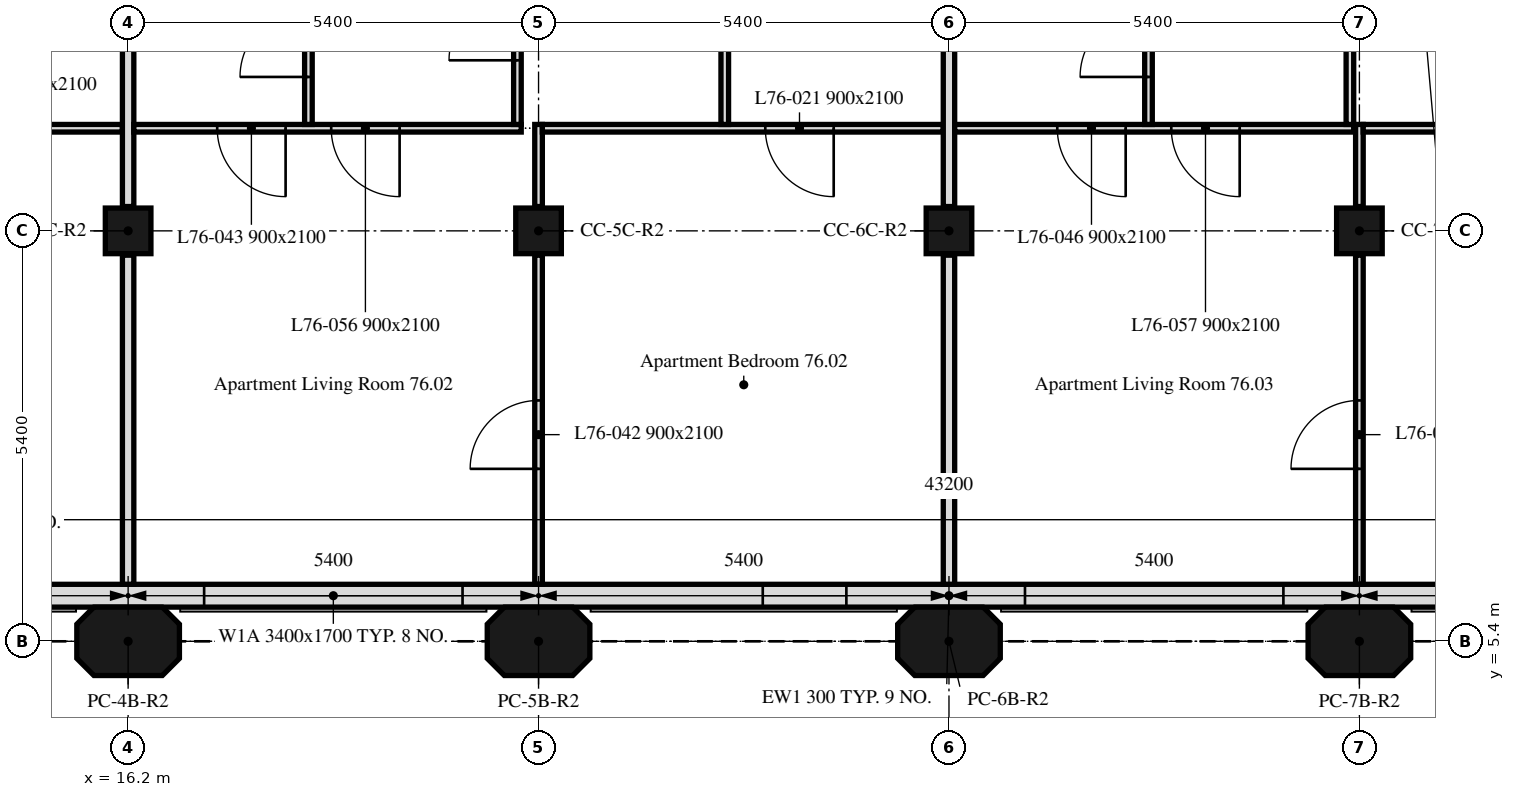
"""IFC4 building model, lengths in metres.
Left out: names, types, materials, properties, quantities, classifications, styles, units other than length and angle.
Written with IfcOpenShell. Run it as: python <this file> out.ifc"""

import sys

from ifc_helpers import new_model, si_unit, direction, frame, frame_2d, origin, origin_2d, place, context, subcontext, project, spatial, polyline, rectangle, outline, extrude, element, fill, save


model = new_model("IFC4")
c1 = context("Model", 3, precision=1e-05, world=origin(), true_north=direction((0.0, 1.0)))
c2 = subcontext(c1, "Body", "Model", "MODEL_VIEW")
j1 = project(units=[si_unit("LENGTHUNIT", "METRE"), si_unit("PLANEANGLEUNIT", "RADIAN")], contexts=[c1])
p1 = place(None, origin())
s1 = spatial("IfcSite", under=j1, at=p1, CompositionType="ELEMENT")
p2 = place(p1, origin())
s2 = spatial("IfcBuilding", under=s1, at=p2, CompositionType="ELEMENT")
p3 = place(p2, frame((0.0, 0.0, 304.9)))
s3 = spatial("IfcBuildingStorey", under=s2, at=p3, CompositionType="ELEMENT", Elevation=304.9)
for number, where, z_axis, x_axis in (
    (1, (16.2, 5.4, 0.0), (0.0, 0.0, 1.0), (1.0, 0.0, 0.0)),
    (2, (21.6, 5.4, 0.0), (0.0, 0.0, 1.0), (1.0, 0.0, 0.0)),
    (3, (27.0, 5.4, 0.0), (0.0, 0.0, 1.0), (1.0, 0.0, 0.0)),
    (4, (32.4, 5.4, 0.0), (0.0, 0.0, 1.0), (1.0, 0.0, 0.0)),
):
    element("IfcColumn", number, at=place(p3, frame(where, z_axis=z_axis, x_axis=x_axis)), inside=s3, PredefinedType="COLUMN", context=c2, shape_type="SweptSolid", body=[
        extrude(outline(polyline([(-0.45, -0.45), (0.45, -0.45), (0.675, -0.225), (0.675, 0.225), (0.45, 0.45), (-0.45, 0.45), (-0.675, 0.225), (-0.675, -0.225), (-0.45, -0.45)])), origin(), (0.0, 0.0, 1.0), 2.8),
    ])
for number, where, z_axis, x_axis in (
    (5, (16.2, 10.8, 0.0), (0.0, 0.0, 1.0), (1.0, 0.0, 0.0)),
    (6, (21.6, 10.8, 0.0), (0.0, 0.0, 1.0), (1.0, 0.0, 0.0)),
    (7, (27.0, 10.8, 0.0), (0.0, 0.0, 1.0), (1.0, 0.0, 0.0)),
    (8, (32.4, 10.8, 0.0), (0.0, 0.0, 1.0), (1.0, 0.0, 0.0)),
):
    element("IfcColumn", number, at=place(p3, frame(where, z_axis=z_axis, x_axis=x_axis)), inside=s3, PredefinedType="COLUMN", context=c2, shape_type="SweptSolid", body=[
        extrude(rectangle(XDim=0.6, YDim=0.6, at=origin_2d()), origin(), (0.0, 0.0, 1.0), 2.8),
    ])
p4 = place(p3, frame((10.986, 6.0, 0.0), z_axis=(0.0, 0.0, 1.0), x_axis=(1.0, 0.0, 0.0)))
e9 = element("IfcWall", 9, at=p4, inside=s3, PredefinedType="SOLIDWALL", context=c2, shape_type="SweptSolid", body=[
    extrude(rectangle(XDim=32.027, YDim=0.3, at=frame_2d((16.014, 0.0))), origin(), (0.0, 0.0, 1.0), 2.8),
])
p5 = place(p4, frame((2.764, 0.0, 0.9)))
e10 = element("IfcOpeningElement", 10, at=p5, cuts=e9, PredefinedType="OPENING", context=c2, shape_type="SweptSolid", body=[
    extrude(rectangle(XDim=1.1, YDim=1.7, at=frame_2d((0.55, 0.85))), frame((0.0, 0.16, 0.0), z_axis=(0.0, -1.0, 0.0), x_axis=(1.0, 0.0, 0.0)), (0.0, 0.0, 1.0), 0.32),
])
p6 = place(p4, frame((6.214, 0.0, 0.9)))
e11 = element("IfcOpeningElement", 11, at=p6, cuts=e9, PredefinedType="OPENING", context=c2, shape_type="SweptSolid", body=[
    extrude(rectangle(XDim=3.4, YDim=1.7, at=frame_2d((1.7, 0.85))), frame((0.0, 0.16, 0.0), z_axis=(0.0, -1.0, 0.0), x_axis=(1.0, 0.0, 0.0)), (0.0, 0.0, 1.0), 0.32),
])
p7 = place(p4, frame((13.564, 0.0, 0.9)))
e12 = element("IfcOpeningElement", 12, at=p7, cuts=e9, PredefinedType="OPENING", context=c2, shape_type="SweptSolid", body=[
    extrude(rectangle(XDim=1.1, YDim=1.7, at=frame_2d((0.55, 0.85))), frame((0.0, 0.16, 0.0), z_axis=(0.0, -1.0, 0.0), x_axis=(1.0, 0.0, 0.0)), (0.0, 0.0, 1.0), 0.32),
])
p8 = place(p4, frame((17.014, 0.0, 0.9)))
e13 = element("IfcOpeningElement", 13, at=p8, cuts=e9, PredefinedType="OPENING", context=c2, shape_type="SweptSolid", body=[
    extrude(rectangle(XDim=3.4, YDim=1.7, at=frame_2d((1.7, 0.85))), frame((0.0, 0.16, 0.0), z_axis=(0.0, -1.0, 0.0), x_axis=(1.0, 0.0, 0.0)), (0.0, 0.0, 1.0), 0.32),
])
p9 = place(p4, frame((24.364, 0.0, 0.9)))
e14 = element("IfcOpeningElement", 14, at=p9, cuts=e9, PredefinedType="OPENING", context=c2, shape_type="SweptSolid", body=[
    extrude(rectangle(XDim=1.1, YDim=1.7, at=frame_2d((0.55, 0.85))), frame((0.0, 0.16, 0.0), z_axis=(0.0, -1.0, 0.0), x_axis=(1.0, 0.0, 0.0)), (0.0, 0.0, 1.0), 0.32),
])
p10 = place(p4, frame((27.814, 0.0, 0.9)))
e15 = element("IfcOpeningElement", 15, at=p10, cuts=e9, PredefinedType="OPENING", context=c2, shape_type="SweptSolid", body=[
    extrude(rectangle(XDim=3.4, YDim=1.7, at=frame_2d((1.7, 0.85))), frame((0.0, 0.16, 0.0), z_axis=(0.0, -1.0, 0.0), x_axis=(1.0, 0.0, 0.0)), (0.0, 0.0, 1.0), 0.32),
])
p11 = place(p3, frame((16.2, 6.151, 0.0), z_axis=(0.0, 0.0, 1.0), x_axis=(0.0, 1.0, 0.0)))
e16 = element("IfcWall", 16, at=p11, inside=s3, PredefinedType="PARTITIONING", context=c2, shape_type="SweptSolid", body=[
    extrude(rectangle(XDim=4.329, YDim=0.15, at=frame_2d((2.165, 0.0))), origin(), (0.0, 0.0, 1.0), 2.8),
])
p12 = place(p3, frame((16.125, 12.15, 0.0), z_axis=(0.0, 0.0, 1.0), x_axis=(-1.0, 0.0, 0.0)))
e17 = element("IfcWall", 17, at=p12, inside=s3, PredefinedType="PARTITIONING", context=c2, shape_type="SweptSolid", body=[
    extrude(rectangle(XDim=5.275, YDim=0.1, at=frame_2d((2.637, 0.0))), origin(), (0.0, 0.0, 1.0), 2.8),
])
p13 = place(p12, frame((1.43, 0.0, 0.0)))
e18 = element("IfcOpeningElement", 18, at=p13, cuts=e17, PredefinedType="OPENING", context=c2, shape_type="SweptSolid", body=[
    extrude(rectangle(XDim=0.9, YDim=2.1, at=frame_2d((0.45, 1.05))), frame((0.0, 0.05, 0.0), z_axis=(0.0, -1.0, 0.0), x_axis=(1.0, 0.0, 0.0)), (0.0, 0.0, 1.0), 0.1),
])
p14 = place(p3, frame((16.2, 11.12, 0.0), z_axis=(0.0, 0.0, 1.0), x_axis=(0.0, 1.0, 0.0)))
e19 = element("IfcWall", 19, at=p14, inside=s3, PredefinedType="PARTITIONING", context=c2, shape_type="SweptSolid", body=[
    extrude(rectangle(XDim=3.205, YDim=0.15, at=frame_2d((1.603, 0.0))), origin(), (0.0, 0.0, 1.0), 2.8),
])
p15 = place(p3, frame((21.6, 6.151, 0.0), z_axis=(0.0, 0.0, 1.0), x_axis=(0.0, 1.0, 0.0)))
e20 = element("IfcWall", 20, at=p15, inside=s3, PredefinedType="PARTITIONING", context=c2, shape_type="SweptSolid", body=[
    extrude(rectangle(XDim=4.329, YDim=0.1, at=frame_2d((2.165, 0.0))), origin(), (0.0, 0.0, 1.0), 2.8),
])
p16 = place(p15, frame((1.518, 0.0, 0.0)))
e21 = element("IfcOpeningElement", 21, at=p16, cuts=e20, PredefinedType="OPENING", context=c2, shape_type="SweptSolid", body=[
    extrude(rectangle(XDim=0.9, YDim=2.1, at=frame_2d((0.45, 1.05))), frame((0.0, 0.05, 0.0), z_axis=(0.0, -1.0, 0.0), x_axis=(1.0, 0.0, 0.0)), (0.0, 0.0, 1.0), 0.1),
])
p17 = place(p3, frame((21.6, 11.12, 0.0), z_axis=(0.0, 0.0, 1.0), x_axis=(0.0, 1.0, 0.0)))
e22 = element("IfcWall", 22, at=p17, inside=s3, PredefinedType="PARTITIONING", context=c2, shape_type="SweptSolid", body=[
    extrude(rectangle(XDim=1.08, YDim=0.1, at=frame_2d((0.54, 0.0))), origin(), (0.0, 0.0, 1.0), 2.8),
])
p18 = place(p3, frame((21.372, 12.15, 0.0), z_axis=(0.0, 0.0, 1.0), x_axis=(-1.0, 0.0, 0.0)))
e23 = element("IfcWall", 23, at=p18, inside=s3, PredefinedType="PARTITIONING", context=c2, shape_type="SweptSolid", body=[
    extrude(rectangle(XDim=5.097, YDim=0.1, at=frame_2d((2.549, 0.0))), origin(), (0.0, 0.0, 1.0), 2.8),
])
p19 = place(p18, frame((3.1, 0.0, 0.0)))
e24 = element("IfcOpeningElement", 24, at=p19, cuts=e23, PredefinedType="OPENING", context=c2, shape_type="SweptSolid", body=[
    extrude(rectangle(XDim=0.9, YDim=2.1, at=frame_2d((0.45, 1.05))), frame((0.0, 0.05, 0.0), z_axis=(0.0, -1.0, 0.0), x_axis=(1.0, 0.0, 0.0)), (0.0, 0.0, 1.0), 0.1),
])
p20 = place(p18, frame((1.6, 0.0, 0.0)))
e25 = element("IfcOpeningElement", 25, at=p20, cuts=e23, PredefinedType="OPENING", context=c2, shape_type="SweptSolid", body=[
    extrude(rectangle(XDim=0.9, YDim=2.1, at=frame_2d((0.45, 1.05))), frame((0.0, 0.05, 0.0), z_axis=(0.0, -1.0, 0.0), x_axis=(1.0, 0.0, 0.0)), (0.0, 0.0, 1.0), 0.1),
])
p21 = place(p3, frame((27.0, 6.151, 0.0), z_axis=(0.0, 0.0, 1.0), x_axis=(0.0, 1.0, 0.0)))
e26 = element("IfcWall", 26, at=p21, inside=s3, PredefinedType="PARTITIONING", context=c2, shape_type="SweptSolid", body=[
    extrude(rectangle(XDim=4.329, YDim=0.15, at=frame_2d((2.165, 0.0))), origin(), (0.0, 0.0, 1.0), 2.8),
])
p22 = place(p3, frame((26.925, 12.15, 0.0), z_axis=(0.0, 0.0, 1.0), x_axis=(-1.0, 0.0, 0.0)))
e27 = element("IfcWall", 27, at=p22, inside=s3, PredefinedType="PARTITIONING", context=c2, shape_type="SweptSolid", body=[
    extrude(rectangle(XDim=5.275, YDim=0.1, at=frame_2d((2.638, 0.0))), origin(), (0.0, 0.0, 1.0), 2.8),
])
p23 = place(p22, frame((1.442, 0.0, 0.0)))
e28 = element("IfcOpeningElement", 28, at=p23, cuts=e27, PredefinedType="OPENING", context=c2, shape_type="SweptSolid", body=[
    extrude(rectangle(XDim=0.9, YDim=2.1, at=frame_2d((0.45, 1.05))), frame((0.0, 0.05, 0.0), z_axis=(0.0, -1.0, 0.0), x_axis=(1.0, 0.0, 0.0)), (0.0, 0.0, 1.0), 0.1),
])
p24 = place(p3, frame((18.572, 12.2, 0.0), z_axis=(0.0, 0.0, 1.0), x_axis=(0.0, 1.0, 0.0)))
e29 = element("IfcWall", 29, at=p24, inside=s3, PredefinedType="PARTITIONING", context=c2, shape_type="SweptSolid", body=[
    extrude(rectangle(XDim=2.125, YDim=0.1, at=frame_2d((1.062, 0.0))), origin(), (0.0, 0.0, 1.0), 2.8),
])
p25 = place(p24, frame((0.625, 0.0, 0.0)))
e30 = element("IfcOpeningElement", 30, at=p25, cuts=e29, PredefinedType="OPENING", context=c2, shape_type="SweptSolid", body=[
    extrude(rectangle(XDim=0.9, YDim=2.1, at=frame_2d((0.45, 1.05))), frame((0.0, 0.05, 0.0), z_axis=(0.0, -1.0, 0.0), x_axis=(1.0, 0.0, 0.0)), (0.0, 0.0, 1.0), 0.1),
])
p26 = place(p3, frame((21.322, 12.2, 0.0), z_axis=(0.0, 0.0, 1.0), x_axis=(0.0, 1.0, 0.0)))
e31 = element("IfcWall", 31, at=p26, inside=s3, PredefinedType="PARTITIONING", context=c2, shape_type="SweptSolid", body=[
    extrude(rectangle(XDim=2.125, YDim=0.1, at=frame_2d((1.062, 0.0))), origin(), (0.0, 0.0, 1.0), 2.8),
])
p27 = place(p26, frame((0.844, 0.0, 0.0)))
e32 = element("IfcOpeningElement", 32, at=p27, cuts=e31, PredefinedType="OPENING", context=c2, shape_type="SweptSolid", body=[
    extrude(rectangle(XDim=0.9, YDim=2.1, at=frame_2d((0.45, 1.05))), frame((0.0, 0.05, 0.0), z_axis=(0.0, -1.0, 0.0), x_axis=(1.0, 0.0, 0.0)), (0.0, 0.0, 1.0), 0.1),
])
p28 = place(p3, frame((24.05, 12.2, 0.0), z_axis=(0.0, 0.0, 1.0), x_axis=(0.0, 1.0, 0.0)))
e33 = element("IfcWall", 33, at=p28, inside=s3, PredefinedType="PARTITIONING", context=c2, shape_type="SweptSolid", body=[
    extrude(rectangle(XDim=2.125, YDim=0.1, at=frame_2d((1.062, 0.0))), origin(), (0.0, 0.0, 1.0), 2.8),
])
p29 = place(p3, frame((27.0, 11.12, 0.0), z_axis=(0.0, 0.0, 1.0), x_axis=(0.0, 1.0, 0.0)))
e34 = element("IfcWall", 34, at=p29, inside=s3, PredefinedType="PARTITIONING", context=c2, shape_type="SweptSolid", body=[
    extrude(rectangle(XDim=3.205, YDim=0.15, at=frame_2d((1.603, 0.0))), origin(), (0.0, 0.0, 1.0), 2.8),
])
p30 = place(p3, frame((32.4, 6.151, 0.0), z_axis=(0.0, 0.0, 1.0), x_axis=(0.0, 1.0, 0.0)))
e35 = element("IfcWall", 35, at=p30, inside=s3, PredefinedType="PARTITIONING", context=c2, shape_type="SweptSolid", body=[
    extrude(rectangle(XDim=4.329, YDim=0.1, at=frame_2d((2.165, 0.0))), origin(), (0.0, 0.0, 1.0), 2.8),
])
p31 = place(p30, frame((1.518, 0.0, 0.0)))
e36 = element("IfcOpeningElement", 36, at=p31, cuts=e35, PredefinedType="OPENING", context=c2, shape_type="SweptSolid", body=[
    extrude(rectangle(XDim=0.9, YDim=2.1, at=frame_2d((0.45, 1.05))), frame((0.0, 0.05, 0.0), z_axis=(0.0, -1.0, 0.0), x_axis=(1.0, 0.0, 0.0)), (0.0, 0.0, 1.0), 0.1),
])
p32 = place(p3, frame((32.4, 11.12, 0.0), z_axis=(0.0, 0.0, 1.0), x_axis=(0.0, 1.0, 0.0)))
e37 = element("IfcWall", 37, at=p32, inside=s3, PredefinedType="PARTITIONING", context=c2, shape_type="SweptSolid", body=[
    extrude(rectangle(XDim=1.08, YDim=0.1, at=frame_2d((0.54, 0.0))), origin(), (0.0, 0.0, 1.0), 2.8),
])
p33 = place(p3, frame((32.325, 12.15, 0.0), z_axis=(0.0, 0.0, 1.0), x_axis=(-1.0, 0.0, 0.0)))
e38 = element("IfcWall", 38, at=p33, inside=s3, PredefinedType="PARTITIONING", context=c2, shape_type="SweptSolid", body=[
    extrude(rectangle(XDim=5.25, YDim=0.1, at=frame_2d((2.625, 0.0))), origin(), (0.0, 0.0, 1.0), 2.8),
])
p34 = place(p33, frame((3.0, 0.0, 0.0)))
e39 = element("IfcOpeningElement", 39, at=p34, cuts=e38, PredefinedType="OPENING", context=c2, shape_type="SweptSolid", body=[
    extrude(rectangle(XDim=0.9, YDim=2.1, at=frame_2d((0.45, 1.05))), frame((0.0, 0.05, 0.0), z_axis=(0.0, -1.0, 0.0), x_axis=(1.0, 0.0, 0.0)), (0.0, 0.0, 1.0), 0.1),
])
p35 = place(p33, frame((1.5, 0.0, 0.0)))
e40 = element("IfcOpeningElement", 40, at=p35, cuts=e38, PredefinedType="OPENING", context=c2, shape_type="SweptSolid", body=[
    extrude(rectangle(XDim=0.9, YDim=2.1, at=frame_2d((0.45, 1.05))), frame((0.0, 0.05, 0.0), z_axis=(0.0, -1.0, 0.0), x_axis=(1.0, 0.0, 0.0)), (0.0, 0.0, 1.0), 0.1),
])
p36 = place(p3, frame((37.725, 12.15, 0.0), z_axis=(0.0, 0.0, 1.0), x_axis=(-1.0, 0.0, 0.0)))
e41 = element("IfcWall", 41, at=p36, inside=s3, PredefinedType="PARTITIONING", context=c2, shape_type="SweptSolid", body=[
    extrude(rectangle(XDim=5.275, YDim=0.1, at=frame_2d((2.638, 0.0))), origin(), (0.0, 0.0, 1.0), 2.8),
])
p37 = place(p36, frame((2.155, 0.0, 0.0)))
e42 = element("IfcOpeningElement", 42, at=p37, cuts=e41, PredefinedType="OPENING", context=c2, shape_type="SweptSolid", body=[
    extrude(rectangle(XDim=0.9, YDim=2.1, at=frame_2d((0.45, 1.05))), frame((0.0, 0.05, 0.0), z_axis=(0.0, -1.0, 0.0), x_axis=(1.0, 0.0, 0.0)), (0.0, 0.0, 1.0), 0.1),
])
p38 = place(p3, frame((29.625, 12.2, 0.0), z_axis=(0.0, 0.0, 1.0), x_axis=(0.0, 1.0, 0.0)))
e43 = element("IfcWall", 43, at=p38, inside=s3, PredefinedType="PARTITIONING", context=c2, shape_type="SweptSolid", body=[
    extrude(rectangle(XDim=2.125, YDim=0.1, at=frame_2d((1.062, 0.0))), origin(), (0.0, 0.0, 1.0), 2.8),
])
p39 = place(p38, frame((0.625, 0.0, 0.0)))
e44 = element("IfcOpeningElement", 44, at=p39, cuts=e43, PredefinedType="OPENING", context=c2, shape_type="SweptSolid", body=[
    extrude(rectangle(XDim=0.9, YDim=2.1, at=frame_2d((0.45, 1.05))), frame((0.0, 0.05, 0.0), z_axis=(0.0, -1.0, 0.0), x_axis=(1.0, 0.0, 0.0)), (0.0, 0.0, 1.0), 0.1),
])
p40 = place(p3, frame((32.275, 12.2, 0.0), z_axis=(0.0, 0.0, 1.0), x_axis=(0.0, 1.0, 0.0)))
e45 = element("IfcWall", 45, at=p40, inside=s3, PredefinedType="PARTITIONING", context=c2, shape_type="SweptSolid", body=[
    extrude(rectangle(XDim=2.125, YDim=0.1, at=frame_2d((1.062, 0.0))), origin(), (0.0, 0.0, 1.0), 2.8),
])
p41 = place(p40, frame((0.975, 0.0, 0.0)))
e46 = element("IfcOpeningElement", 46, at=p41, cuts=e45, PredefinedType="OPENING", context=c2, shape_type="SweptSolid", body=[
    extrude(rectangle(XDim=0.9, YDim=2.1, at=frame_2d((0.45, 1.05))), frame((0.0, 0.05, 0.0), z_axis=(0.0, -1.0, 0.0), x_axis=(1.0, 0.0, 0.0)), (0.0, 0.0, 1.0), 0.1),
])
p42 = place(p6, origin())
e47 = element("IfcWindow", 47, at=p42, inside=s3, PartitioningType="SINGLE_PANEL", PredefinedType="WINDOW", context=c2, shape_type="SweptSolid", body=[
    extrude(rectangle(XDim=3.4, YDim=1.7, at=frame_2d((1.7, 0.85))), frame((0.0, 0.03, 0.0), z_axis=(0.0, -1.0, 0.0), x_axis=(1.0, 0.0, 0.0)), (0.0, 0.0, 1.0), 0.06),
])
fill(e11, e47)
p43 = place(p7, origin())
e48 = element("IfcWindow", 48, at=p43, inside=s3, PartitioningType="SINGLE_PANEL", PredefinedType="WINDOW", context=c2, shape_type="SweptSolid", body=[
    extrude(rectangle(XDim=1.1, YDim=1.7, at=frame_2d((0.55, 0.85))), frame((0.0, 0.03, 0.0), z_axis=(0.0, -1.0, 0.0), x_axis=(1.0, 0.0, 0.0)), (0.0, 0.0, 1.0), 0.06),
])
fill(e12, e48)
p44 = place(p8, origin())
e49 = element("IfcWindow", 49, at=p44, inside=s3, PartitioningType="SINGLE_PANEL", PredefinedType="WINDOW", context=c2, shape_type="SweptSolid", body=[
    extrude(rectangle(XDim=3.4, YDim=1.7, at=frame_2d((1.7, 0.85))), frame((0.0, 0.03, 0.0), z_axis=(0.0, -1.0, 0.0), x_axis=(1.0, 0.0, 0.0)), (0.0, 0.0, 1.0), 0.06),
])
fill(e13, e49)
p45 = place(p23, origin())
e50 = element("IfcDoor", 50, at=p45, inside=s3, OperationType="SINGLE_SWING_LEFT", PredefinedType="DOOR", context=c2, shape_type="SweptSolid", body=[
    extrude(rectangle(XDim=0.9, YDim=2.1, at=frame_2d((0.45, 1.05))), frame((0.0, 0.025, 0.0), z_axis=(0.0, -1.0, 0.0), x_axis=(1.0, 0.0, 0.0)), (0.0, 0.0, 1.0), 0.05),
])
fill(e28, e50)
p46 = place(p27, origin())
e51 = element("IfcDoor", 51, at=p46, inside=s3, OperationType="SINGLE_SWING_LEFT", PredefinedType="DOOR", context=c2, shape_type="SweptSolid", body=[
    extrude(rectangle(XDim=0.9, YDim=2.1, at=frame_2d((0.45, 1.05))), frame((0.0, 0.025, 0.0), z_axis=(0.0, -1.0, 0.0), x_axis=(1.0, 0.0, 0.0)), (0.0, 0.0, 1.0), 0.05),
])
fill(e32, e51)
p47 = place(p16, origin())
e52 = element("IfcDoor", 52, at=p47, inside=s3, OperationType="SINGLE_SWING_RIGHT", PredefinedType="DOOR", context=c2, shape_type="SweptSolid", body=[
    extrude(rectangle(XDim=0.9, YDim=2.1, at=frame_2d((0.45, 1.05))), frame((0.0, 0.025, 0.0), z_axis=(0.0, -1.0, 0.0), x_axis=(1.0, 0.0, 0.0)), (0.0, 0.0, 1.0), 0.05),
])
fill(e21, e52)
p48 = place(p19, origin())
e53 = element("IfcDoor", 53, at=p48, inside=s3, OperationType="SINGLE_SWING_RIGHT", PredefinedType="DOOR", context=c2, shape_type="SweptSolid", body=[
    extrude(rectangle(XDim=0.9, YDim=2.1, at=frame_2d((0.45, 1.05))), frame((0.0, 0.025, 0.0), z_axis=(0.0, -1.0, 0.0), x_axis=(1.0, 0.0, 0.0)), (0.0, 0.0, 1.0), 0.05),
])
fill(e24, e53)
p49 = place(p25, origin())
e54 = element("IfcDoor", 54, at=p49, inside=s3, OperationType="SINGLE_SWING_LEFT", PredefinedType="DOOR", context=c2, shape_type="SweptSolid", body=[
    extrude(rectangle(XDim=0.9, YDim=2.1, at=frame_2d((0.45, 1.05))), frame((0.0, 0.025, 0.0), z_axis=(0.0, -1.0, 0.0), x_axis=(1.0, 0.0, 0.0)), (0.0, 0.0, 1.0), 0.05),
])
fill(e30, e54)
p50 = place(p31, origin())
e55 = element("IfcDoor", 55, at=p50, inside=s3, OperationType="SINGLE_SWING_LEFT", PredefinedType="DOOR", context=c2, shape_type="SweptSolid", body=[
    extrude(rectangle(XDim=0.9, YDim=2.1, at=frame_2d((0.45, 1.05))), frame((0.0, 0.025, 0.0), z_axis=(0.0, -1.0, 0.0), x_axis=(1.0, 0.0, 0.0)), (0.0, 0.0, 1.0), 0.05),
])
fill(e36, e55)
p51 = place(p34, origin())
e56 = element("IfcDoor", 56, at=p51, inside=s3, OperationType="SINGLE_SWING_RIGHT", PredefinedType="DOOR", context=c2, shape_type="SweptSolid", body=[
    extrude(rectangle(XDim=0.9, YDim=2.1, at=frame_2d((0.45, 1.05))), frame((0.0, 0.025, 0.0), z_axis=(0.0, -1.0, 0.0), x_axis=(1.0, 0.0, 0.0)), (0.0, 0.0, 1.0), 0.05),
])
fill(e39, e56)
p52 = place(p39, origin())
e57 = element("IfcDoor", 57, at=p52, inside=s3, OperationType="SINGLE_SWING_RIGHT", PredefinedType="DOOR", context=c2, shape_type="SweptSolid", body=[
    extrude(rectangle(XDim=0.9, YDim=2.1, at=frame_2d((0.45, 1.05))), frame((0.0, 0.025, 0.0), z_axis=(0.0, -1.0, 0.0), x_axis=(1.0, 0.0, 0.0)), (0.0, 0.0, 1.0), 0.05),
])
fill(e44, e57)
p53 = place(p20, origin())
e58 = element("IfcDoor", 58, at=p53, inside=s3, OperationType="SINGLE_SWING_LEFT", PredefinedType="DOOR", context=c2, shape_type="SweptSolid", body=[
    extrude(rectangle(XDim=0.9, YDim=2.1, at=frame_2d((0.45, 1.05))), frame((0.0, 0.025, 0.0), z_axis=(0.0, -1.0, 0.0), x_axis=(1.0, 0.0, 0.0)), (0.0, 0.0, 1.0), 0.05),
])
fill(e25, e58)
p54 = place(p35, origin())
e59 = element("IfcDoor", 59, at=p54, inside=s3, OperationType="SINGLE_SWING_LEFT", PredefinedType="DOOR", context=c2, shape_type="SweptSolid", body=[
    extrude(rectangle(XDim=0.9, YDim=2.1, at=frame_2d((0.45, 1.05))), frame((0.0, 0.025, 0.0), z_axis=(0.0, -1.0, 0.0), x_axis=(1.0, 0.0, 0.0)), (0.0, 0.0, 1.0), 0.05),
])
fill(e40, e59)
save(model, sys.argv[1])
